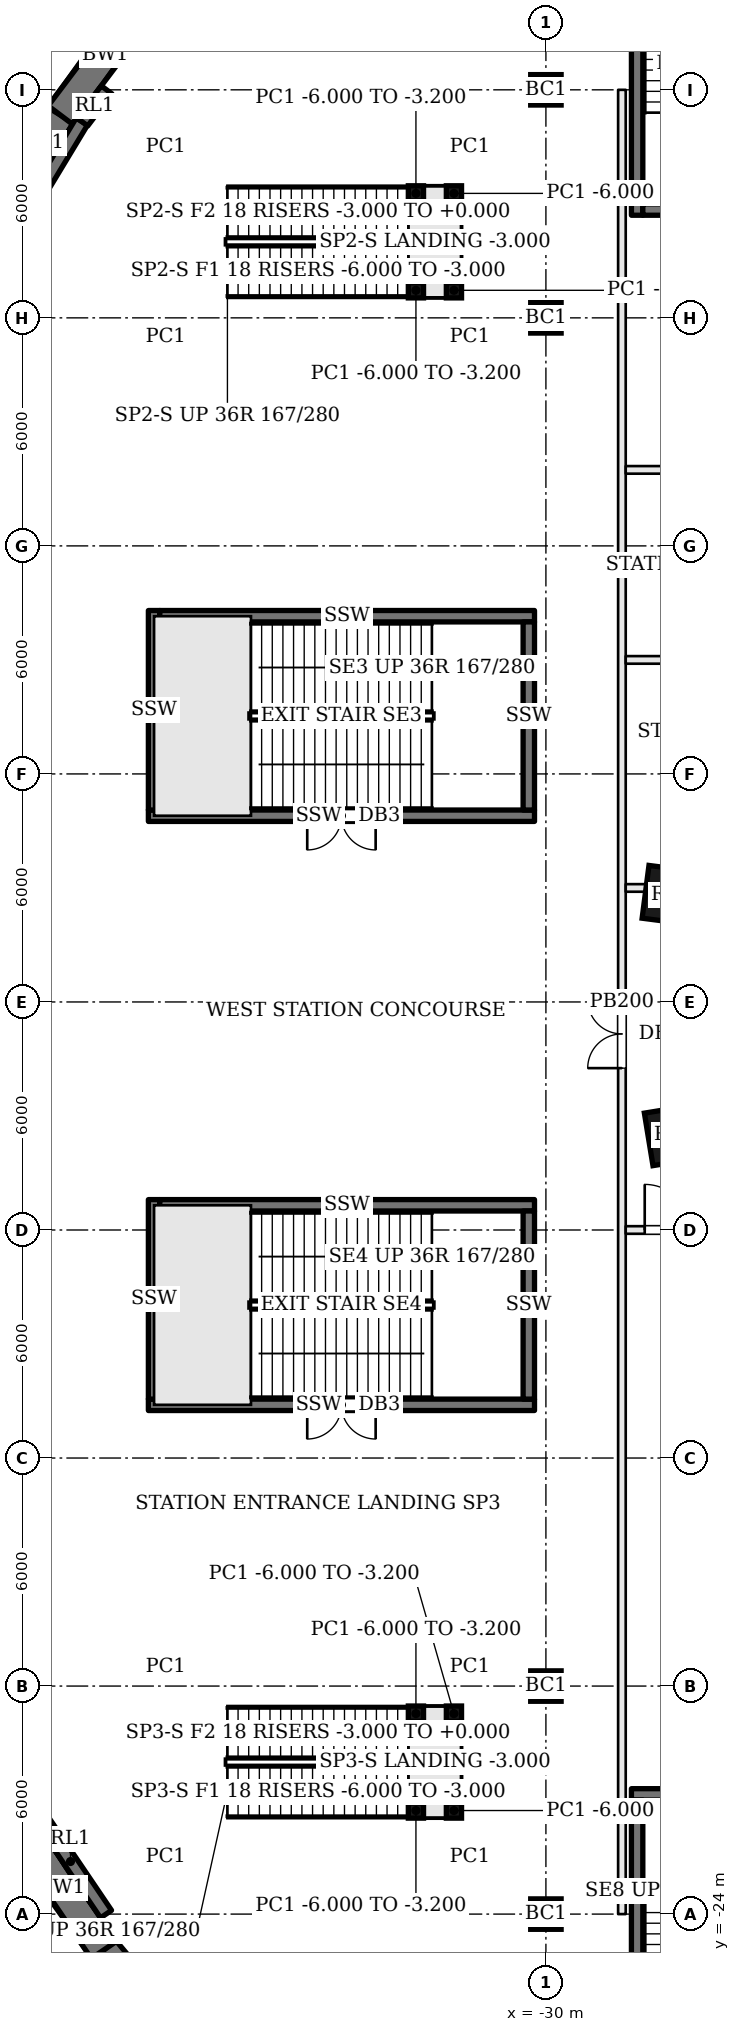
"""IFC4 building model, lengths in metres.
Left out: names, types, materials, properties, quantities, classifications, styles, units other than length and angle.
Written with IfcOpenShell. Run it as: python <this file> out.ifc"""

import sys

from ifc_helpers import new_model, si_unit, direction, frame, frame_2d, origin, origin_2d, place, context, subcontext, project, spatial, rectangle, extrude, element, fill, save


model = new_model("IFC4")
c1 = context("Model", 3, precision=1e-05, world=origin(), true_north=direction((0.0, 1.0)))
c2 = subcontext(c1, "Body", "Model", "MODEL_VIEW")
j1 = project(units=[si_unit("LENGTHUNIT", "METRE"), si_unit("PLANEANGLEUNIT", "RADIAN")], contexts=[c1])
p1 = place(None, origin())
s1 = spatial("IfcSite", under=j1, at=p1, CompositionType="ELEMENT")
p2 = place(p1, origin())
s2 = spatial("IfcBuilding", under=s1, at=p2, CompositionType="ELEMENT")
p3 = place(p2, frame((0.0, 0.0, -6.0)))
s3 = spatial("IfcBuildingStorey", under=s2, at=p3, CompositionType="ELEMENT", Elevation=-6.0)
p4 = place(p3, frame((-39.101, -27.966, 0.0), z_axis=(0.0, 0.0, 1.0), x_axis=(-0.641663169407, 0.766986555962, 0.0)))
e1 = element("IfcWall", 1, at=p4, inside=s3, PredefinedType="SOLIDWALL", context=c2, shape_type="SweptSolid", body=[
    extrude(rectangle(XDim=3.943, YDim=0.8, at=frame_2d((1.971, 0.0))), origin(), (0.0, 0.0, 1.0), 5.65),
])
p5 = place(p3, frame((-41.631, -24.942, 0.0), z_axis=(0.0, 0.0, 1.0), x_axis=(-0.560375599992, 0.828238605073, 0.0)))
e2 = element("IfcWall", 2, at=p5, inside=s3, PredefinedType="SOLIDWALL", context=c2, shape_type="SweptSolid", body=[
    extrude(rectangle(XDim=3.942, YDim=0.8, at=frame_2d((1.971, 0.0))), origin(), (0.0, 0.0, 1.0), 5.65),
])
p6 = place(p3, frame((-44.816, 19.964, 0.0), z_axis=(0.0, 0.0, 1.0), x_axis=(0.517025826806, 0.855969797607, 0.0)))
e3 = element("IfcWall", 3, at=p6, inside=s3, PredefinedType="SOLIDWALL", context=c2, shape_type="SweptSolid", body=[
    extrude(rectangle(XDim=3.941, YDim=0.8, at=frame_2d((1.971, 0.0))), origin(), (0.0, 0.0, 1.0), 5.65),
])
p7 = place(p3, frame((-42.778, 23.338, 0.0), z_axis=(0.0, 0.0, 1.0), x_axis=(0.601930372291, 0.798548575175, 0.0)))
e4 = element("IfcWall", 4, at=p7, inside=s3, PredefinedType="SOLIDWALL", context=c2, shape_type="SweptSolid", body=[
    extrude(rectangle(XDim=3.942, YDim=0.8, at=frame_2d((1.971, 0.0))), origin(), (0.0, 0.0, 1.0), 5.65),
])
for number, where, z_axis, x_axis in (
    (5, (-30.0, -24.0, 0.0), (0.0, 0.0, 1.0), (1.0, 0.0, 0.0)),
    (6, (-30.0, -18.0, 0.0), (0.0, 0.0, 1.0), (1.0, 0.0, 0.0)),
    (7, (-30.0, 18.0, 0.0), (0.0, 0.0, 1.0), (1.0, 0.0, 0.0)),
    (8, (-30.0, 24.0, 0.0), (0.0, 0.0, 1.0), (1.0, 0.0, 0.0)),
):
    element("IfcColumn", number, at=place(p3, frame(where, z_axis=z_axis, x_axis=x_axis)), inside=s3, PredefinedType="COLUMN", context=c2, shape_type="SweptSolid", body=[
        extrude(rectangle(XDim=0.8, YDim=0.8, at=origin_2d()), origin(), (0.0, 0.0, 1.0), 6.0),
    ])
for number, where, z_axis, x_axis in (
    (9, (-26.684, 2.808, 0.0), (0.0, 0.0, 1.0), (-0.128, -0.992, 0.0)),
    (10, (-26.605, -3.503, 0.0), (0.0, 0.0, 1.0), (0.161, -0.987, 0.0)),
):
    element("IfcColumn", number, at=place(p3, frame(where, z_axis=z_axis, x_axis=x_axis)), inside=s3, PredefinedType="COLUMN", context=c2, shape_type="SweptSolid", body=[
        extrude(rectangle(XDim=1.4, YDim=1.4, at=origin_2d()), origin(), (0.0, 0.0, 1.0), 6.0),
    ])
for number, where, z_axis, x_axis in (
    (11, (-40.0, 17.5, 0.0), (0.0, 0.0, 1.0), (1.0, 0.0, 0.0)),
    (12, (-32.0, 17.5, 0.0), (0.0, 0.0, 1.0), (1.0, 0.0, 0.0)),
    (13, (-32.0, 22.5, 0.0), (0.0, 0.0, 1.0), (1.0, 0.0, 0.0)),
    (14, (-40.0, 22.5, 0.0), (0.0, 0.0, 1.0), (1.0, 0.0, 0.0)),
):
    element("IfcColumn", number, at=place(p3, frame(where, z_axis=z_axis, x_axis=x_axis)), inside=s3, PredefinedType="COLUMN", context=c2, shape_type="SweptSolid", body=[
        extrude(rectangle(XDim=0.4, YDim=0.4, at=origin_2d()), origin(), (0.0, 0.0, 1.0), 6.0),
    ])
for number, where, z_axis, x_axis in (
    (15, (-33.42, 18.725, 0.0), (0.0, 0.0, 1.0), (1.0, 0.0, 0.0)),
    (16, (-32.42, 18.725, 0.0), (0.0, 0.0, 1.0), (1.0, 0.0, 0.0)),
    (17, (-32.42, 21.275, 0.0), (0.0, 0.0, 1.0), (1.0, 0.0, 0.0)),
    (18, (-33.42, 21.275, 0.0), (0.0, 0.0, 1.0), (1.0, 0.0, 0.0)),
):
    element("IfcColumn", number, at=place(p3, frame(where, z_axis=z_axis, x_axis=x_axis)), inside=s3, PredefinedType="COLUMN", context=c2, shape_type="SweptSolid", body=[
        extrude(rectangle(XDim=0.4, YDim=0.4, at=origin_2d()), origin(), (0.0, 0.0, 1.0), 2.8),
    ])
for number, where, z_axis, x_axis in (
    (19, (-40.0, -22.5, 0.0), (0.0, 0.0, 1.0), (1.0, 0.0, 0.0)),
    (20, (-32.0, -22.5, 0.0), (0.0, 0.0, 1.0), (1.0, 0.0, 0.0)),
    (21, (-32.0, -17.5, 0.0), (0.0, 0.0, 1.0), (1.0, 0.0, 0.0)),
    (22, (-40.0, -17.5, 0.0), (0.0, 0.0, 1.0), (1.0, 0.0, 0.0)),
):
    element("IfcColumn", number, at=place(p3, frame(where, z_axis=z_axis, x_axis=x_axis)), inside=s3, PredefinedType="COLUMN", context=c2, shape_type="SweptSolid", body=[
        extrude(rectangle(XDim=0.4, YDim=0.4, at=origin_2d()), origin(), (0.0, 0.0, 1.0), 6.0),
    ])
for number, where, z_axis, x_axis in (
    (23, (-33.42, -21.275, 0.0), (0.0, 0.0, 1.0), (1.0, 0.0, 0.0)),
    (24, (-32.42, -21.275, 0.0), (0.0, 0.0, 1.0), (1.0, 0.0, 0.0)),
    (25, (-32.42, -18.725, 0.0), (0.0, 0.0, 1.0), (1.0, 0.0, 0.0)),
    (26, (-33.42, -18.725, 0.0), (0.0, 0.0, 1.0), (1.0, 0.0, 0.0)),
):
    element("IfcColumn", number, at=place(p3, frame(where, z_axis=z_axis, x_axis=x_axis)), inside=s3, PredefinedType="COLUMN", context=c2, shape_type="SweptSolid", body=[
        extrude(rectangle(XDim=0.4, YDim=0.4, at=origin_2d()), origin(), (0.0, 0.0, 1.0), 2.8),
    ])
p8 = place(p3, frame((-28.0, -24.0, 0.0), z_axis=(0.0, 0.0, 1.0), x_axis=(0.0, 1.0, 0.0)))
e27 = element("IfcWall", 27, at=p8, inside=s3, PredefinedType="PARTITIONING", context=c2, shape_type="SweptSolid", body=[
    extrude(rectangle(XDim=48.0, YDim=0.2, at=frame_2d((24.0, 0.0))), origin(), (0.0, 0.0, 1.0), 5.148),
])
p9 = place(p8, frame((22.259, 0.0, 0.0)))
e28 = element("IfcOpeningElement", 28, at=p9, cuts=e27, PredefinedType="OPENING", context=c2, shape_type="SweptSolid", body=[
    extrude(rectangle(XDim=1.8, YDim=2.1, at=frame_2d((0.9, 1.05))), frame((0.0, 0.11, 0.0), z_axis=(0.0, -1.0, 0.0), x_axis=(1.0, 0.0, 0.0)), (0.0, 0.0, 1.0), 0.22),
])
p10 = place(p3, frame((-27.9, -6.0, 0.0), z_axis=(0.0, 0.0, 1.0), x_axis=(1.0, 0.0, 0.0)))
e29 = element("IfcWall", 29, at=p10, inside=s3, PredefinedType="PARTITIONING", context=c2, shape_type="SweptSolid", body=[
    extrude(rectangle(XDim=55.8, YDim=0.2, at=frame_2d((27.9, 0.0))), origin(), (0.0, 0.0, 1.0), 5.148),
])
p11 = place(p10, frame((0.5, 0.0, 0.0)))
e30 = element("IfcOpeningElement", 30, at=p11, cuts=e29, PredefinedType="OPENING", context=c2, shape_type="SweptSolid", body=[
    extrude(rectangle(XDim=1.2, YDim=2.1, at=frame_2d((0.6, 1.05))), frame((0.0, 0.11, 0.0), z_axis=(0.0, -1.0, 0.0), x_axis=(1.0, 0.0, 0.0)), (0.0, 0.0, 1.0), 0.22),
])
p12 = place(p10, frame((1.94, 0.0, 0.0)))
e31 = element("IfcOpeningElement", 31, at=p12, cuts=e29, PredefinedType="OPENING", context=c2, shape_type="SweptSolid", body=[
    extrude(rectangle(XDim=1.2, YDim=2.1, at=frame_2d((0.6, 1.05))), frame((0.0, 0.11, 0.0), z_axis=(0.0, -1.0, 0.0), x_axis=(1.0, 0.0, 0.0)), (0.0, 0.0, 1.0), 0.22),
])
p13 = place(p10, frame((3.38, 0.0, 0.0)))
e32 = element("IfcOpeningElement", 32, at=p13, cuts=e29, PredefinedType="OPENING", context=c2, shape_type="SweptSolid", body=[
    extrude(rectangle(XDim=1.2, YDim=2.1, at=frame_2d((0.6, 1.05))), frame((0.0, 0.11, 0.0), z_axis=(0.0, -1.0, 0.0), x_axis=(1.0, 0.0, 0.0)), (0.0, 0.0, 1.0), 0.22),
])
p14 = place(p10, frame((4.82, 0.0, 0.0)))
e33 = element("IfcOpeningElement", 33, at=p14, cuts=e29, PredefinedType="OPENING", context=c2, shape_type="SweptSolid", body=[
    extrude(rectangle(XDim=1.2, YDim=2.1, at=frame_2d((0.6, 1.05))), frame((0.0, 0.11, 0.0), z_axis=(0.0, -1.0, 0.0), x_axis=(1.0, 0.0, 0.0)), (0.0, 0.0, 1.0), 0.22),
])
p15 = place(p10, frame((6.5, 0.0, 0.0)))
e34 = element("IfcOpeningElement", 34, at=p15, cuts=e29, PredefinedType="OPENING", context=c2, shape_type="SweptSolid", body=[
    extrude(rectangle(XDim=1.2, YDim=2.1, at=frame_2d((0.6, 1.05))), frame((0.0, 0.11, 0.0), z_axis=(0.0, -1.0, 0.0), x_axis=(1.0, 0.0, 0.0)), (0.0, 0.0, 1.0), 0.22),
])
p16 = place(p10, frame((7.94, 0.0, 0.0)))
e35 = element("IfcOpeningElement", 35, at=p16, cuts=e29, PredefinedType="OPENING", context=c2, shape_type="SweptSolid", body=[
    extrude(rectangle(XDim=1.2, YDim=2.1, at=frame_2d((0.6, 1.05))), frame((0.0, 0.11, 0.0), z_axis=(0.0, -1.0, 0.0), x_axis=(1.0, 0.0, 0.0)), (0.0, 0.0, 1.0), 0.22),
])
p17 = place(p10, frame((9.32, 0.0, 0.0)))
e36 = element("IfcOpeningElement", 36, at=p17, cuts=e29, PredefinedType="OPENING", context=c2, shape_type="SweptSolid", body=[
    extrude(rectangle(XDim=1.8, YDim=2.1, at=frame_2d((0.9, 1.05))), frame((0.0, 0.11, 0.0), z_axis=(0.0, -1.0, 0.0), x_axis=(1.0, 0.0, 0.0)), (0.0, 0.0, 1.0), 0.22),
])
p18 = place(p3, frame((-22.5, -20.85, 0.0), z_axis=(0.0, 0.0, 1.0), x_axis=(-1.0, 0.0, 0.0)))
e37 = element("IfcWall", 37, at=p18, inside=s3, PredefinedType="SOLIDWALL", context=c2, shape_type="SweptSolid", body=[
    extrude(rectangle(XDim=5.25, YDim=0.3, at=frame_2d((2.625, 0.0))), origin(), (0.0, 0.0, 1.0), 5.65),
])
p19 = place(p3, frame((-27.6, -21.0, 0.0), z_axis=(0.0, 0.0, 1.0), x_axis=(0.0, -1.0, 0.0)))
e38 = element("IfcWall", 38, at=p19, inside=s3, PredefinedType="SOLIDWALL", context=c2, shape_type="SweptSolid", body=[
    extrude(rectangle(XDim=9.86, YDim=0.3, at=frame_2d((4.93, 0.0))), origin(), (0.0, 0.0, 1.0), 5.65),
])
p20 = place(p3, frame((-17.9, 14.0, 0.0), z_axis=(0.0, 0.0, 1.0), x_axis=(-1.0, 0.0, 0.0)))
e39 = element("IfcWall", 39, at=p20, inside=s3, PredefinedType="PARTITIONING", context=c2, shape_type="SweptSolid", body=[
    extrude(rectangle(XDim=10.0, YDim=0.2, at=frame_2d((5.0, 0.0))), origin(), (0.0, 0.0, 1.0), 5.134),
])
p21 = place(p3, frame((-27.9, 9.0, 0.0), z_axis=(0.0, 0.0, 1.0), x_axis=(1.0, 0.0, 0.0)))
e40 = element("IfcWall", 40, at=p21, inside=s3, PredefinedType="PARTITIONING", context=c2, shape_type="SweptSolid", body=[
    extrude(rectangle(XDim=6.8, YDim=0.2, at=frame_2d((3.4, 0.0))), origin(), (0.0, 0.0, 1.0), 5.134),
])
p22 = place(p3, frame((-27.6, 30.86, 0.0), z_axis=(0.0, 0.0, 1.0), x_axis=(0.0, -1.0, 0.0)))
e41 = element("IfcWall", 41, at=p22, inside=s3, PredefinedType="SOLIDWALL", context=c2, shape_type="SweptSolid", body=[
    extrude(rectangle(XDim=10.16, YDim=0.3, at=frame_2d((5.08, 0.0))), origin(), (0.0, 0.0, 1.0), 5.65),
])
p23 = place(p3, frame((-27.45, 20.85, 0.0), z_axis=(0.0, 0.0, 1.0), x_axis=(1.0, 0.0, 0.0)))
e42 = element("IfcWall", 42, at=p23, inside=s3, PredefinedType="SOLIDWALL", context=c2, shape_type="SweptSolid", body=[
    extrude(rectangle(XDim=5.25, YDim=0.3, at=frame_2d((2.625, 0.0))), origin(), (0.0, 0.0, 1.0), 5.65),
])
p24 = place(p3, frame((-27.9, 3.0, 0.0), z_axis=(0.0, 0.0, 1.0), x_axis=(1.0, 0.0, 0.0)))
e43 = element("IfcWall", 43, at=p24, inside=s3, PredefinedType="PARTITIONING", context=c2, shape_type="SweptSolid", body=[
    extrude(rectangle(XDim=6.8, YDim=0.2, at=frame_2d((3.4, 0.0))), origin(), (0.0, 0.0, 1.0), 5.148),
])
p25 = place(p24, frame((3.241, 0.0, 0.0)))
e44 = element("IfcOpeningElement", 44, at=p25, cuts=e43, PredefinedType="OPENING", context=c2, shape_type="SweptSolid", body=[
    extrude(rectangle(XDim=1.0, YDim=2.1, at=frame_2d((0.5, 1.05))), frame((0.0, 0.11, 0.0), z_axis=(0.0, -1.0, 0.0), x_axis=(1.0, 0.0, 0.0)), (0.0, 0.0, 1.0), 0.22),
])
p26 = place(p3, frame((-30.3, 4.9, 0.0), z_axis=(0.0, 0.0, 1.0), x_axis=(-1.0, 0.0, 0.0)))
e45 = element("IfcWall", 45, at=p26, inside=s3, PredefinedType="SOLIDWALL", context=c2, shape_type="SweptSolid", body=[
    extrude(rectangle(XDim=10.16, YDim=0.3, at=frame_2d((5.08, 0.0))), origin(), (0.0, 0.0, 1.0), 5.65),
])
p27 = place(p26, frame((4.18, 0.0, 0.0)))
e46 = element("IfcOpeningElement", 46, at=p27, cuts=e45, PredefinedType="OPENING", context=c2, shape_type="SweptSolid", body=[
    extrude(rectangle(XDim=1.8, YDim=2.1, at=frame_2d((0.9, 1.05))), frame((0.0, 0.16, 0.0), z_axis=(0.0, -1.0, 0.0), x_axis=(1.0, 0.0, 0.0)), (0.0, 0.0, 1.0), 0.32),
])
p28 = place(p3, frame((-40.31, 5.05, 0.0), z_axis=(0.0, 0.0, 1.0), x_axis=(0.0, 1.0, 0.0)))
e47 = element("IfcWall", 47, at=p28, inside=s3, PredefinedType="SOLIDWALL", context=c2, shape_type="SweptSolid", body=[
    extrude(rectangle(XDim=5.25, YDim=0.3, at=frame_2d((2.625, 0.0))), origin(), (0.0, 0.0, 1.0), 5.65),
])
p29 = place(p3, frame((-40.16, 10.15, 0.0), z_axis=(0.0, 0.0, 1.0), x_axis=(1.0, 0.0, 0.0)))
e48 = element("IfcWall", 48, at=p29, inside=s3, PredefinedType="SOLIDWALL", context=c2, shape_type="SweptSolid", body=[
    extrude(rectangle(XDim=9.86, YDim=0.3, at=frame_2d((4.93, 0.0))), origin(), (0.0, 0.0, 1.0), 5.65),
])
p30 = place(p3, frame((-30.45, 10.0, 0.0), z_axis=(0.0, 0.0, 1.0), x_axis=(0.0, -1.0, 0.0)))
e49 = element("IfcWall", 49, at=p30, inside=s3, PredefinedType="SOLIDWALL", context=c2, shape_type="SweptSolid", body=[
    extrude(rectangle(XDim=4.95, YDim=0.3, at=frame_2d((2.475, 0.0))), origin(), (0.0, 0.0, 1.0), 5.65),
])
p31 = place(p3, frame((-30.3, -10.6, 0.0), z_axis=(0.0, 0.0, 1.0), x_axis=(-1.0, 0.0, 0.0)))
e50 = element("IfcWall", 50, at=p31, inside=s3, PredefinedType="SOLIDWALL", context=c2, shape_type="SweptSolid", body=[
    extrude(rectangle(XDim=10.16, YDim=0.3, at=frame_2d((5.08, 0.0))), origin(), (0.0, 0.0, 1.0), 5.65),
])
p32 = place(p31, frame((4.18, 0.0, 0.0)))
e51 = element("IfcOpeningElement", 51, at=p32, cuts=e50, PredefinedType="OPENING", context=c2, shape_type="SweptSolid", body=[
    extrude(rectangle(XDim=1.8, YDim=2.1, at=frame_2d((0.9, 1.05))), frame((0.0, 0.16, 0.0), z_axis=(0.0, -1.0, 0.0), x_axis=(1.0, 0.0, 0.0)), (0.0, 0.0, 1.0), 0.32),
])
p33 = place(p3, frame((-40.31, -10.45, 0.0), z_axis=(0.0, 0.0, 1.0), x_axis=(0.0, 1.0, 0.0)))
e52 = element("IfcWall", 52, at=p33, inside=s3, PredefinedType="SOLIDWALL", context=c2, shape_type="SweptSolid", body=[
    extrude(rectangle(XDim=5.25, YDim=0.3, at=frame_2d((2.625, 0.0))), origin(), (0.0, 0.0, 1.0), 5.65),
])
p34 = place(p3, frame((-40.16, -5.35, 0.0), z_axis=(0.0, 0.0, 1.0), x_axis=(1.0, 0.0, 0.0)))
e53 = element("IfcWall", 53, at=p34, inside=s3, PredefinedType="SOLIDWALL", context=c2, shape_type="SweptSolid", body=[
    extrude(rectangle(XDim=9.86, YDim=0.3, at=frame_2d((4.93, 0.0))), origin(), (0.0, 0.0, 1.0), 5.65),
])
p35 = place(p3, frame((-30.45, -5.5, 0.0), z_axis=(0.0, 0.0, 1.0), x_axis=(0.0, -1.0, 0.0)))
e54 = element("IfcWall", 54, at=p35, inside=s3, PredefinedType="SOLIDWALL", context=c2, shape_type="SweptSolid", body=[
    extrude(rectangle(XDim=4.95, YDim=0.3, at=frame_2d((2.475, 0.0))), origin(), (0.0, 0.0, 1.0), 5.65),
])
p36 = place(p3, frame((-41.574, -24.0, 0.0), z_axis=(0.0, 0.0, 1.0), x_axis=(-0.560288715468, 0.828297383383, 0.0)))
e55 = element("IfcWall", 55, at=p36, inside=s3, PredefinedType="SOLIDWALL", context=c2, shape_type="SweptSolid", body=[
    extrude(rectangle(XDim=3.34, YDim=0.35, at=frame_2d((1.67, 0.0))), origin(), (0.0, 0.0, 1.0), 5.65),
])
p37 = place(p3, frame((-44.218, 19.842, 0.0), z_axis=(0.0, 0.0, 1.0), x_axis=(0.517009094838, 0.855979903885, 0.0)))
e56 = element("IfcWall", 56, at=p37, inside=s3, PredefinedType="SOLIDWALL", context=c2, shape_type="SweptSolid", body=[
    extrude(rectangle(XDim=3.882, YDim=0.35, at=frame_2d((1.941, 0.0))), origin(), (0.0, 0.0, 1.0), 5.65),
])
p38 = place(p3, frame((-42.196, 23.155, 0.0), z_axis=(0.0, 0.0, 1.0), x_axis=(0.601954731545, 0.798530213061, 0.0)))
e57 = element("IfcWall", 57, at=p38, inside=s3, PredefinedType="SOLIDWALL", context=c2, shape_type="SweptSolid", body=[
    extrude(rectangle(XDim=1.058, YDim=0.35, at=frame_2d((0.529, 0.0))), origin(), (0.0, 0.0, 1.0), 5.65),
])
p39 = place(p27, origin())
e58 = element("IfcDoor", 58, at=p39, inside=s3, OperationType="DOUBLE_DOOR_SINGLE_SWING", PredefinedType="DOOR", context=c2, shape_type="SweptSolid", body=[
    extrude(rectangle(XDim=1.8, YDim=2.1, at=frame_2d((0.9, 1.05))), frame((0.0, 0.025, 0.0), z_axis=(0.0, -1.0, 0.0), x_axis=(1.0, 0.0, 0.0)), (0.0, 0.0, 1.0), 0.05),
])
fill(e46, e58)
p40 = place(p32, origin())
e59 = element("IfcDoor", 59, at=p40, inside=s3, OperationType="DOUBLE_DOOR_SINGLE_SWING", PredefinedType="DOOR", context=c2, shape_type="SweptSolid", body=[
    extrude(rectangle(XDim=1.8, YDim=2.1, at=frame_2d((0.9, 1.05))), frame((0.0, 0.025, 0.0), z_axis=(0.0, -1.0, 0.0), x_axis=(1.0, 0.0, 0.0)), (0.0, 0.0, 1.0), 0.05),
])
fill(e51, e59)
p41 = place(p11, origin())
e60 = element("IfcDoor", 60, at=p41, inside=s3, OperationType="SINGLE_SWING_LEFT", PredefinedType="GATE", context=c2, shape_type="SweptSolid", body=[
    extrude(rectangle(XDim=1.2, YDim=2.1, at=frame_2d((0.6, 1.05))), frame((0.0, 0.025, 0.0), z_axis=(0.0, -1.0, 0.0), x_axis=(1.0, 0.0, 0.0)), (0.0, 0.0, 1.0), 0.05),
])
fill(e30, e60)
p42 = place(p9, origin())
e61 = element("IfcDoor", 61, at=p42, inside=s3, OperationType="DOUBLE_DOOR_SINGLE_SWING", PredefinedType="DOOR", context=c2, shape_type="SweptSolid", body=[
    extrude(rectangle(XDim=1.8, YDim=2.1, at=frame_2d((0.9, 1.05))), frame((0.0, 0.025, 0.0), z_axis=(0.0, -1.0, 0.0), x_axis=(1.0, 0.0, 0.0)), (0.0, 0.0, 1.0), 0.05),
])
fill(e28, e61)
save(model, sys.argv[1])
